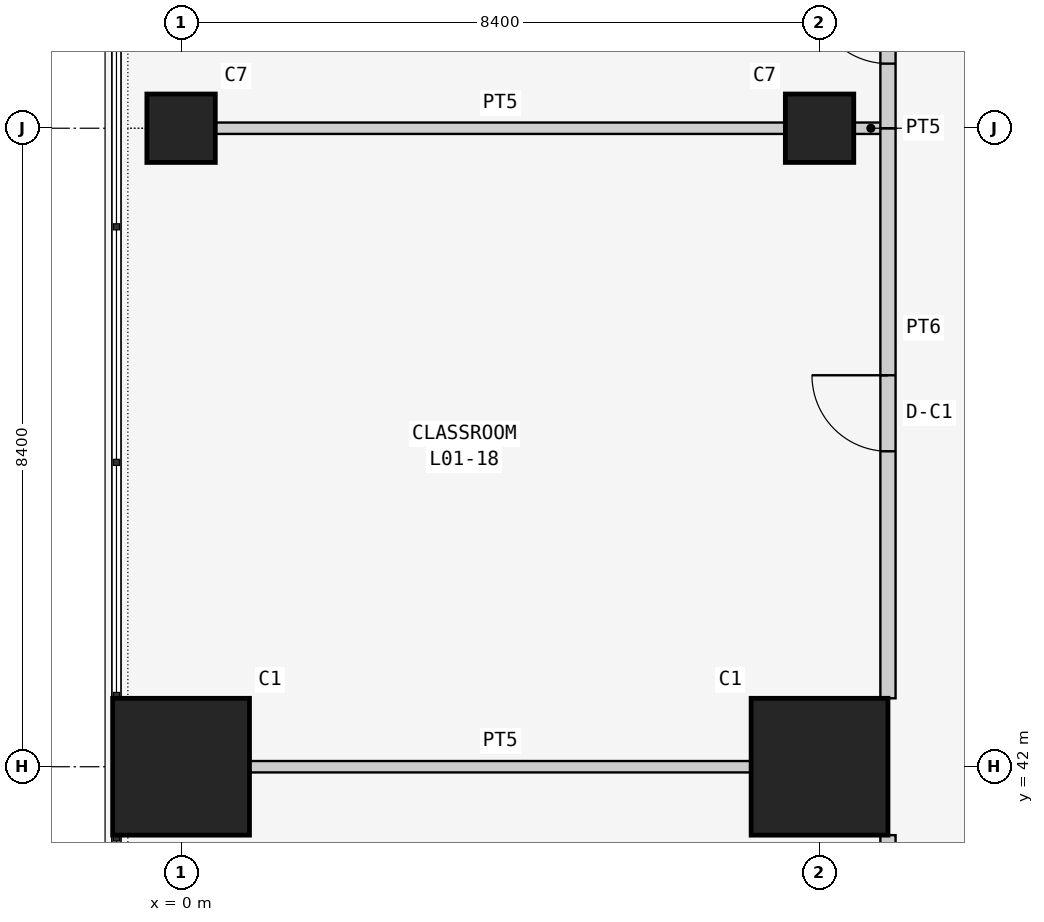
"""IFC4 building model, lengths in metres.
Left out: names, types, materials, properties, quantities, classifications, styles, units other than length and angle.
Written with IfcOpenShell. Run it as: python <this file> out.ifc"""

import sys

from ifc_helpers import new_model, si_unit, direction, frame, frame_2d, origin, origin_2d, place, context, subcontext, project, spatial, rectangle, extrude, element, fill, save


model = new_model("IFC4")
c1 = context("Model", 3, precision=1e-05, world=origin(), true_north=direction((0.0, 1.0)))
c2 = subcontext(c1, "Body", "Model", "MODEL_VIEW")
j1 = project(units=[si_unit("LENGTHUNIT", "METRE"), si_unit("PLANEANGLEUNIT", "RADIAN")], contexts=[c1])
p1 = place(None, origin())
s1 = spatial("IfcSite", under=j1, at=p1, CompositionType="ELEMENT")
p2 = place(p1, origin())
s2 = spatial("IfcBuilding", under=s1, at=p2, CompositionType="ELEMENT")
p3 = place(p2, frame((0.0, 0.0, 6.0)))
s3 = spatial("IfcBuildingStorey", under=s2, at=p3, CompositionType="ELEMENT", Elevation=6.0)
p4 = place(p3, frame((0.0, 42.0, 0.0), z_axis=(0.0, 0.0, 1.0), x_axis=(1.0, 0.0, 0.0)))
e1 = element("IfcColumn", 1, at=p4, inside=s3, PredefinedType="COLUMN", context=c2, shape_type="SweptSolid", body=[
    extrude(rectangle(XDim=1.8, YDim=1.8, at=origin_2d()), origin(), (0.0, 0.0, 1.0), 4.5),
])
p5 = place(p3, frame((0.0, 50.4, 0.0), z_axis=(0.0, 0.0, 1.0), x_axis=(1.0, 0.0, 0.0)))
e2 = element("IfcColumn", 2, at=p5, inside=s3, PredefinedType="COLUMN", context=c2, shape_type="SweptSolid", body=[
    extrude(rectangle(XDim=0.9, YDim=0.9, at=origin_2d()), origin(), (0.0, 0.0, 1.0), 4.5),
])
p6 = place(p3, frame((8.4, 42.0, 0.0), z_axis=(0.0, 0.0, 1.0), x_axis=(1.0, 0.0, 0.0)))
e3 = element("IfcColumn", 3, at=p6, inside=s3, PredefinedType="COLUMN", context=c2, shape_type="SweptSolid", body=[
    extrude(rectangle(XDim=1.8, YDim=1.8, at=origin_2d()), origin(), (0.0, 0.0, 1.0), 4.5),
])
p7 = place(p3, frame((8.4, 50.4, 0.0), z_axis=(0.0, 0.0, 1.0), x_axis=(1.0, 0.0, 0.0)))
e4 = element("IfcColumn", 4, at=p7, inside=s3, PredefinedType="COLUMN", context=c2, shape_type="SweptSolid", body=[
    extrude(rectangle(XDim=0.9, YDim=0.9, at=origin_2d()), origin(), (0.0, 0.0, 1.0), 4.5),
])
p8 = place(p3, frame((0.9, 42.0, 0.0), z_axis=(0.0, 0.0, 1.0), x_axis=(1.0, 0.0, 0.0)))
e5 = element("IfcWall", 5, at=p8, inside=s3, PredefinedType="PARTITIONING", context=c2, shape_type="SweptSolid", body=[
    extrude(rectangle(XDim=6.6, YDim=0.15, at=frame_2d((3.3, 0.0))), origin(), (0.0, 0.0, 1.0), 3.543),
])
p9 = place(p3, frame((9.3, 41.1, 0.0), z_axis=(0.0, 0.0, 1.0), x_axis=(0.0, -1.0, 0.0)))
e6 = element("IfcWall", 6, at=p9, inside=s3, PredefinedType="PARTITIONING", context=c2, shape_type="SweptSolid", body=[
    extrude(rectangle(XDim=6.6, YDim=0.2, at=frame_2d((3.3, 0.0))), origin(), (0.0, 0.0, 1.0), 4.3),
])
p10 = place(p9, frame((2.8, 0.0, 0.0)))
e7 = element("IfcOpeningElement", 7, at=p10, cuts=e6, PredefinedType="OPENING", context=c2, shape_type="SweptSolid", body=[
    extrude(rectangle(XDim=1.0, YDim=2.1, at=frame_2d((0.5, 1.05))), frame((0.0, 0.11, 0.0), z_axis=(0.0, -1.0, 0.0), x_axis=(1.0, 0.0, 0.0)), (0.0, 0.0, 1.0), 0.22),
])
p11 = place(p3, frame((0.45, 50.4, 0.0), z_axis=(0.0, 0.0, 1.0), x_axis=(1.0, 0.0, 0.0)))
e8 = element("IfcWall", 8, at=p11, inside=s3, PredefinedType="PARTITIONING", context=c2, shape_type="SweptSolid", body=[
    extrude(rectangle(XDim=7.5, YDim=0.15, at=frame_2d((3.75, 0.0))), origin(), (0.0, 0.0, 1.0), 3.543),
])
p12 = place(p3, frame((8.85, 50.4, 0.0), z_axis=(0.0, 0.0, 1.0), x_axis=(1.0, 0.0, 0.0)))
e9 = element("IfcWall", 9, at=p12, inside=s3, PredefinedType="PARTITIONING", context=c2, shape_type="SweptSolid", body=[
    extrude(rectangle(XDim=0.45, YDim=0.15, at=frame_2d((0.225, 0.0))), origin(), (0.0, 0.0, 1.0), 3.543),
])
p13 = place(p3, frame((9.3, 50.4, 0.0), z_axis=(0.0, 0.0, 1.0), x_axis=(0.0, -1.0, 0.0)))
e10 = element("IfcWall", 10, at=p13, inside=s3, PredefinedType="PARTITIONING", context=c2, shape_type="SweptSolid", body=[
    extrude(rectangle(XDim=7.5, YDim=0.2, at=frame_2d((3.75, 0.0))), origin(), (0.0, 0.0, 1.0), 4.3),
])
p14 = place(p13, frame((3.25, 0.0, 0.0)))
e11 = element("IfcOpeningElement", 11, at=p14, cuts=e10, PredefinedType="OPENING", context=c2, shape_type="SweptSolid", body=[
    extrude(rectangle(XDim=1.0, YDim=2.1, at=frame_2d((0.5, 1.05))), frame((0.0, 0.11, 0.0), z_axis=(0.0, -1.0, 0.0), x_axis=(1.0, 0.0, 0.0)), (0.0, 0.0, 1.0), 0.22),
])
p15 = place(p3, frame((9.3, 53.1, 0.0), z_axis=(0.0, 0.0, 1.0), x_axis=(0.0, -1.0, 0.0)))
e12 = element("IfcWall", 12, at=p15, inside=s3, PredefinedType="PARTITIONING", context=c2, shape_type="SweptSolid", body=[
    extrude(rectangle(XDim=2.7, YDim=0.2, at=frame_2d((1.35, 0.0))), origin(), (0.0, 0.0, 1.0), 4.3),
])
p16 = place(p15, frame((0.85, 0.0, 0.0)))
e13 = element("IfcOpeningElement", 13, at=p16, cuts=e12, PredefinedType="OPENING", context=c2, shape_type="SweptSolid", body=[
    extrude(rectangle(XDim=1.0, YDim=2.1, at=frame_2d((0.5, 1.05))), frame((0.0, 0.11, 0.0), z_axis=(0.0, -1.0, 0.0), x_axis=(1.0, 0.0, 0.0)), (0.0, 0.0, 1.0), 0.22),
])
p17 = place(p14, frame((1.0, 0.0, 0.0), z_axis=(0.0, 0.0, 1.0), x_axis=(-1.0, 0.0, 0.0)))
e14 = element("IfcDoor", 14, at=p17, inside=s3, OperationType="SINGLE_SWING_RIGHT", PredefinedType="DOOR", context=c2, shape_type="SweptSolid", body=[
    extrude(rectangle(XDim=1.0, YDim=2.1, at=frame_2d((0.5, 1.05))), frame((0.0, 0.025, 0.0), z_axis=(0.0, -1.0, 0.0), x_axis=(1.0, 0.0, 0.0)), (0.0, 0.0, 1.0), 0.05),
])
fill(e11, e14)
p18 = place(p16, frame((1.0, 0.0, 0.0), z_axis=(0.0, 0.0, 1.0), x_axis=(-1.0, 0.0, 0.0)))
e15 = element("IfcDoor", 15, at=p18, inside=s3, OperationType="SINGLE_SWING_RIGHT", PredefinedType="DOOR", context=c2, shape_type="SweptSolid", body=[
    extrude(rectangle(XDim=1.0, YDim=2.1, at=frame_2d((0.5, 1.05))), frame((0.0, 0.025, 0.0), z_axis=(0.0, -1.0, 0.0), x_axis=(1.0, 0.0, 0.0)), (0.0, 0.0, 1.0), 0.05),
])
fill(e13, e15)
save(model, sys.argv[1])
